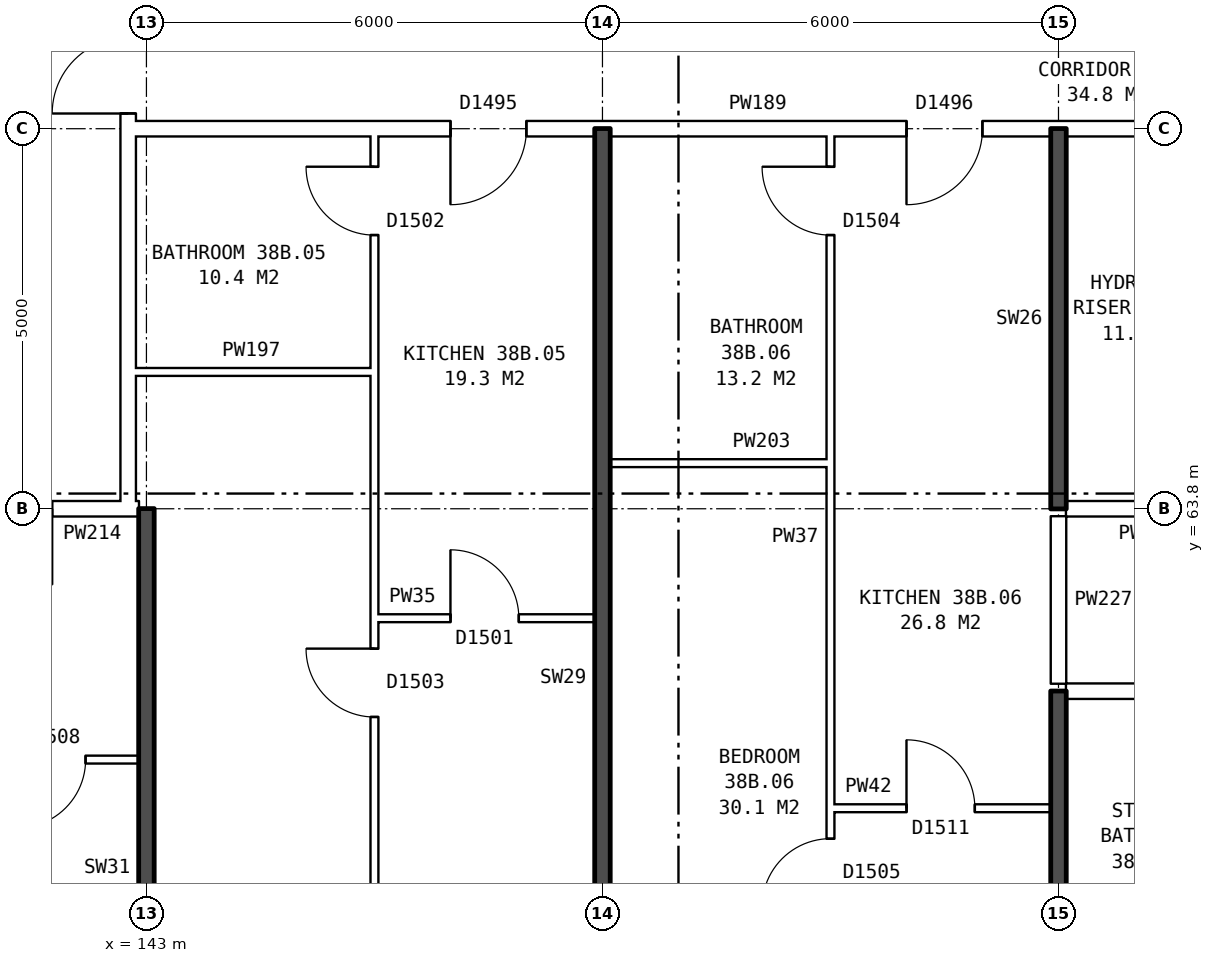
"""IFC4 building model, lengths in metres.
Left out: names, types, materials, properties, quantities, classifications, styles, units other than length and angle.
Written with IfcOpenShell. Run it as: python <this file> out.ifc"""

import sys

from ifc_helpers import new_model, si_unit, direction, frame, frame_2d, origin, place, context, subcontext, project, spatial, rectangle, extrude, element, fill, save


model = new_model("IFC4")
c1 = context("Model", 3, precision=1e-05, world=origin(), true_north=direction((0.0, 1.0)))
c2 = subcontext(c1, "Body", "Model", "MODEL_VIEW")
j1 = project(units=[si_unit("LENGTHUNIT", "METRE"), si_unit("PLANEANGLEUNIT", "RADIAN")], contexts=[c1])
p1 = place(None, origin())
s1 = spatial("IfcSite", under=j1, at=p1, CompositionType="ELEMENT")
p2 = place(p1, origin())
s2 = spatial("IfcBuilding", under=s1, at=p2, CompositionType="ELEMENT")
p3 = place(p2, frame((0.0, 0.0, 136.1)))
s3 = spatial("IfcBuildingStorey", under=s2, at=p3, CompositionType="ELEMENT", Elevation=136.1)
p4 = place(p3, frame((142.76, 63.9, 0.0), z_axis=(0.0, 0.0, 1.0), x_axis=(0.0, 1.0, 0.0)))
e1 = element("IfcWall", 1, at=p4, inside=s3, PredefinedType="PARTITIONING", context=c2, shape_type="SweptSolid", body=[
    extrude(rectangle(XDim=12.2, YDim=0.2, at=frame_2d((6.1, 0.0))), origin(), (0.0, 0.0, 1.0), 2.85),
])
p5 = place(p4, frame((5.1, 0.0, 0.0)))
e2 = element("IfcOpeningElement", 2, at=p5, cuts=e1, PredefinedType="OPENING", context=c2, shape_type="SweptSolid", body=[
    extrude(rectangle(XDim=2.0, YDim=2.1, at=frame_2d((1.0, 1.05))), frame((0.0, 0.11, 0.0), z_axis=(0.0, -1.0, 0.0), x_axis=(1.0, 0.0, 0.0)), (0.0, 0.0, 1.0), 0.22),
])
p6 = place(p3, frame((152.0, 59.86, 0.0), z_axis=(0.0, 0.0, 1.0), x_axis=(1.0, 0.0, 0.0)))
e3 = element("IfcWall", 3, at=p6, inside=s3, PredefinedType="PARTITIONING", context=c2, shape_type="SweptSolid", body=[
    extrude(rectangle(XDim=2.9, YDim=0.1, at=frame_2d((1.45, 0.0))), origin(), (0.0, 0.0, 1.0), 2.85),
])
p7 = place(p6, frame((1.0, 0.0, 0.0)))
e4 = element("IfcOpeningElement", 4, at=p7, cuts=e3, PredefinedType="OPENING", context=c2, shape_type="SweptSolid", body=[
    extrude(rectangle(XDim=0.9, YDim=2.1, at=frame_2d((0.45, 1.05))), frame((0.0, 0.06, 0.0), z_axis=(0.0, -1.0, 0.0), x_axis=(1.0, 0.0, 0.0)), (0.0, 0.0, 1.0), 0.12),
])
p8 = place(p3, frame((137.1, 60.5, 0.0), z_axis=(0.0, 0.0, 1.0), x_axis=(1.0, 0.0, 0.0)))
e5 = element("IfcWall", 5, at=p8, inside=s3, PredefinedType="PARTITIONING", context=c2, shape_type="SweptSolid", body=[
    extrude(rectangle(XDim=5.8, YDim=0.1, at=frame_2d((2.9, 0.0))), origin(), (0.0, 0.0, 1.0), 2.85),
])
p9 = place(p8, frame((1.3, 0.0, 0.0)))
e6 = element("IfcOpeningElement", 6, at=p9, cuts=e5, PredefinedType="OPENING", context=c2, shape_type="SweptSolid", body=[
    extrude(rectangle(XDim=0.9, YDim=2.1, at=frame_2d((0.45, 1.05))), frame((0.0, 0.06, 0.0), z_axis=(0.0, -1.0, 0.0), x_axis=(1.0, 0.0, 0.0)), (0.0, 0.0, 1.0), 0.12),
])
p10 = place(p8, frame((4.2, 0.0, 0.0)))
e7 = element("IfcOpeningElement", 7, at=p10, cuts=e5, PredefinedType="OPENING", context=c2, shape_type="SweptSolid", body=[
    extrude(rectangle(XDim=0.9, YDim=2.1, at=frame_2d((0.45, 1.05))), frame((0.0, 0.06, 0.0), z_axis=(0.0, -1.0, 0.0), x_axis=(1.0, 0.0, 0.0)), (0.0, 0.0, 1.0), 0.12),
])
p11 = place(p3, frame((155.1, 61.4, 0.0), z_axis=(0.0, 0.0, 1.0), x_axis=(1.0, 0.0, 0.0)))
e8 = element("IfcWall", 8, at=p11, inside=s3, PredefinedType="PARTITIONING", context=c2, shape_type="SweptSolid", body=[
    extrude(rectangle(XDim=17.29, YDim=0.2, at=frame_2d((8.645, 0.0))), origin(), (0.0, 0.0, 1.0), 2.85),
])
p12 = place(p11, frame((3.6, 0.0, 0.0)))
e9 = element("IfcOpeningElement", 9, at=p12, cuts=e8, PredefinedType="OPENING", context=c2, shape_type="SweptSolid", body=[
    extrude(rectangle(XDim=1.0, YDim=2.1, at=frame_2d((0.5, 1.05))), frame((0.0, 0.11, 0.0), z_axis=(0.0, -1.0, 0.0), x_axis=(1.0, 0.0, 0.0)), (0.0, 0.0, 1.0), 0.22),
])
p13 = place(p11, frame((8.4, 0.0, 0.0)))
e10 = element("IfcOpeningElement", 10, at=p13, cuts=e8, PredefinedType="OPENING", context=c2, shape_type="SweptSolid", body=[
    extrude(rectangle(XDim=1.0, YDim=2.1, at=frame_2d((0.5, 1.05))), frame((0.0, 0.11, 0.0), z_axis=(0.0, -1.0, 0.0), x_axis=(1.0, 0.0, 0.0)), (0.0, 0.0, 1.0), 0.22),
])
p14 = place(p3, frame((146.0, 62.36, 0.0), z_axis=(0.0, 0.0, 1.0), x_axis=(1.0, 0.0, 0.0)))
e11 = element("IfcWall", 11, at=p14, inside=s3, PredefinedType="PARTITIONING", context=c2, shape_type="SweptSolid", body=[
    extrude(rectangle(XDim=2.9, YDim=0.1, at=frame_2d((1.45, 0.0))), origin(), (0.0, 0.0, 1.0), 2.85),
])
p15 = place(p14, frame((1.0, 0.0, 0.0)))
e12 = element("IfcOpeningElement", 12, at=p15, cuts=e11, PredefinedType="OPENING", context=c2, shape_type="SweptSolid", body=[
    extrude(rectangle(XDim=0.9, YDim=2.1, at=frame_2d((0.45, 1.05))), frame((0.0, 0.06, 0.0), z_axis=(0.0, -1.0, 0.0), x_axis=(1.0, 0.0, 0.0)), (0.0, 0.0, 1.0), 0.12),
])
p16 = place(p3, frame((139.76, 63.8, 0.0), z_axis=(0.0, 0.0, 1.0), x_axis=(1.0, 0.0, 0.0)))
e13 = element("IfcWall", 13, at=p16, inside=s3, PredefinedType="PARTITIONING", context=c2, shape_type="SweptSolid", body=[
    extrude(rectangle(XDim=3.0, YDim=0.2, at=frame_2d((1.5, 0.0))), origin(), (0.0, 0.0, 1.0), 2.85),
])
p17 = place(p16, frame((1.0, 0.0, 0.0)))
e14 = element("IfcOpeningElement", 14, at=p17, cuts=e13, PredefinedType="OPENING", context=c2, shape_type="SweptSolid", body=[
    extrude(rectangle(XDim=1.0, YDim=2.1, at=frame_2d((0.5, 1.05))), frame((0.0, 0.11, 0.0), z_axis=(0.0, -1.0, 0.0), x_axis=(1.0, 0.0, 0.0)), (0.0, 0.0, 1.0), 0.22),
])
p18 = place(p3, frame((142.76, 63.8, 0.0), z_axis=(0.0, 0.0, 1.0), x_axis=(1.0, 0.0, 0.0)))
e15 = element("IfcWall", 15, at=p18, inside=s3, PredefinedType="PARTITIONING", context=c2, shape_type="SweptSolid", body=[
    extrude(rectangle(XDim=0.14, YDim=0.2, at=frame_2d((0.07, 0.0))), origin(), (0.0, 0.0, 1.0), 2.85),
])
p19 = place(p3, frame((155.1, 63.8, 0.0), z_axis=(0.0, 0.0, 1.0), x_axis=(1.0, 0.0, 0.0)))
e16 = element("IfcWall", 16, at=p19, inside=s3, PredefinedType="PARTITIONING", context=c2, shape_type="SweptSolid", body=[
    extrude(rectangle(XDim=2.14, YDim=0.2, at=frame_2d((1.07, 0.0))), origin(), (0.0, 0.0, 1.0), 2.85),
])
p20 = place(p3, frame((149.1, 64.4, 0.0), z_axis=(0.0, 0.0, 1.0), x_axis=(1.0, 0.0, 0.0)))
e17 = element("IfcWall", 17, at=p20, inside=s3, PredefinedType="PARTITIONING", context=c2, shape_type="SweptSolid", body=[
    extrude(rectangle(XDim=2.9, YDim=0.1, at=frame_2d((1.45, 0.0))), origin(), (0.0, 0.0, 1.0), 2.85),
])
p21 = place(p3, frame((142.76, 65.6, 0.0), z_axis=(0.0, 0.0, 1.0), x_axis=(1.0, 0.0, 0.0)))
e18 = element("IfcWall", 18, at=p21, inside=s3, PredefinedType="PARTITIONING", context=c2, shape_type="SweptSolid", body=[
    extrude(rectangle(XDim=3.24, YDim=0.1, at=frame_2d((1.62, 0.0))), origin(), (0.0, 0.0, 1.0), 2.85),
])
p22 = place(p3, frame((142.76, 68.8, 0.0), z_axis=(0.0, 0.0, 1.0), x_axis=(1.0, 0.0, 0.0)))
e19 = element("IfcWall", 19, at=p22, inside=s3, PredefinedType="PARTITIONING", context=c2, shape_type="SweptSolid", body=[
    extrude(rectangle(XDim=14.48, YDim=0.2, at=frame_2d((7.24, 0.0))), origin(), (0.0, 0.0, 1.0), 2.85),
])
p23 = place(p22, frame((4.24, 0.0, 0.0)))
e20 = element("IfcOpeningElement", 20, at=p23, cuts=e19, PredefinedType="OPENING", context=c2, shape_type="SweptSolid", body=[
    extrude(rectangle(XDim=1.0, YDim=2.1, at=frame_2d((0.5, 1.05))), frame((0.0, 0.11, 0.0), z_axis=(0.0, -1.0, 0.0), x_axis=(1.0, 0.0, 0.0)), (0.0, 0.0, 1.0), 0.22),
])
p24 = place(p22, frame((10.24, 0.0, 0.0)))
e21 = element("IfcOpeningElement", 21, at=p24, cuts=e19, PredefinedType="OPENING", context=c2, shape_type="SweptSolid", body=[
    extrude(rectangle(XDim=1.0, YDim=2.1, at=frame_2d((0.5, 1.05))), frame((0.0, 0.11, 0.0), z_axis=(0.0, -1.0, 0.0), x_axis=(1.0, 0.0, 0.0)), (0.0, 0.0, 1.0), 0.22),
])
p25 = place(p3, frame((143.0, 54.36, 0.0), z_axis=(0.0, 0.0, 1.0), x_axis=(0.0, 1.0, 0.0)))
e22 = element("IfcWall", 22, at=p25, inside=s3, PredefinedType="SOLIDWALL", context=c2, shape_type="SweptSolid", body=[
    extrude(rectangle(XDim=9.44, YDim=0.2, at=frame_2d((4.72, 0.0))), origin(), (0.0, 0.0, 1.0), 2.85),
])
p26 = place(p3, frame((146.0, 54.36, 0.0), z_axis=(0.0, 0.0, 1.0), x_axis=(0.0, 1.0, 0.0)))
e23 = element("IfcWall", 23, at=p26, inside=s3, PredefinedType="PARTITIONING", context=c2, shape_type="SweptSolid", body=[
    extrude(rectangle(XDim=14.34, YDim=0.1, at=frame_2d((7.17, 0.0))), origin(), (0.0, 0.0, 1.0), 2.85),
])
p27 = place(p26, frame((6.7, 0.0, 0.0)))
e24 = element("IfcOpeningElement", 24, at=p27, cuts=e23, PredefinedType="OPENING", context=c2, shape_type="SweptSolid", body=[
    extrude(rectangle(XDim=0.9, YDim=2.1, at=frame_2d((0.45, 1.05))), frame((0.0, 0.06, 0.0), z_axis=(0.0, -1.0, 0.0), x_axis=(1.0, 0.0, 0.0)), (0.0, 0.0, 1.0), 0.12),
])
p28 = place(p26, frame((13.04, 0.0, 0.0)))
e25 = element("IfcOpeningElement", 25, at=p28, cuts=e23, PredefinedType="OPENING", context=c2, shape_type="SweptSolid", body=[
    extrude(rectangle(XDim=0.9, YDim=2.1, at=frame_2d((0.45, 1.05))), frame((0.0, 0.06, 0.0), z_axis=(0.0, -1.0, 0.0), x_axis=(1.0, 0.0, 0.0)), (0.0, 0.0, 1.0), 0.12),
])
p29 = place(p3, frame((149.0, 54.36, 0.0), z_axis=(0.0, 0.0, 1.0), x_axis=(0.0, 1.0, 0.0)))
e26 = element("IfcWall", 26, at=p29, inside=s3, PredefinedType="SOLIDWALL", context=c2, shape_type="SweptSolid", body=[
    extrude(rectangle(XDim=14.44, YDim=0.2, at=frame_2d((7.22, 0.0))), origin(), (0.0, 0.0, 1.0), 2.85),
])
p30 = place(p3, frame((152.0, 54.36, 0.0), z_axis=(0.0, 0.0, 1.0), x_axis=(0.0, 1.0, 0.0)))
e27 = element("IfcWall", 27, at=p30, inside=s3, PredefinedType="PARTITIONING", context=c2, shape_type="SweptSolid", body=[
    extrude(rectangle(XDim=14.34, YDim=0.1, at=frame_2d((7.17, 0.0))), origin(), (0.0, 0.0, 1.0), 2.85),
])
p31 = place(p30, frame((4.2, 0.0, 0.0)))
e28 = element("IfcOpeningElement", 28, at=p31, cuts=e27, PredefinedType="OPENING", context=c2, shape_type="SweptSolid", body=[
    extrude(rectangle(XDim=0.9, YDim=2.1, at=frame_2d((0.45, 1.05))), frame((0.0, 0.06, 0.0), z_axis=(0.0, -1.0, 0.0), x_axis=(1.0, 0.0, 0.0)), (0.0, 0.0, 1.0), 0.12),
])
p32 = place(p30, frame((13.04, 0.0, 0.0)))
e29 = element("IfcOpeningElement", 29, at=p32, cuts=e27, PredefinedType="OPENING", context=c2, shape_type="SweptSolid", body=[
    extrude(rectangle(XDim=0.9, YDim=2.1, at=frame_2d((0.45, 1.05))), frame((0.0, 0.06, 0.0), z_axis=(0.0, -1.0, 0.0), x_axis=(1.0, 0.0, 0.0)), (0.0, 0.0, 1.0), 0.12),
])
p33 = place(p3, frame((155.0, 54.36, 0.0), z_axis=(0.0, 0.0, 1.0), x_axis=(0.0, 1.0, 0.0)))
e30 = element("IfcWall", 30, at=p33, inside=s3, PredefinedType="SOLIDWALL", context=c2, shape_type="SweptSolid", body=[
    extrude(rectangle(XDim=7.04, YDim=0.2, at=frame_2d((3.52, 0.0))), origin(), (0.0, 0.0, 1.0), 2.85),
])
p34 = place(p3, frame((155.0, 61.5, 0.0), z_axis=(0.0, 0.0, 1.0), x_axis=(0.0, 1.0, 0.0)))
e31 = element("IfcWall", 31, at=p34, inside=s3, PredefinedType="PARTITIONING", context=c2, shape_type="SweptSolid", body=[
    extrude(rectangle(XDim=2.2, YDim=0.2, at=frame_2d((1.1, 0.0))), origin(), (0.0, 0.0, 1.0), 2.85),
])
p35 = place(p3, frame((155.0, 63.8, 0.0), z_axis=(0.0, 0.0, 1.0), x_axis=(0.0, 1.0, 0.0)))
e32 = element("IfcWall", 32, at=p35, inside=s3, PredefinedType="SOLIDWALL", context=c2, shape_type="SweptSolid", body=[
    extrude(rectangle(XDim=5.0, YDim=0.2, at=frame_2d((2.5, 0.0))), origin(), (0.0, 0.0, 1.0), 2.85),
])
p36 = place(p5, origin())
e33 = element("IfcDoor", 33, at=p36, inside=s3, OperationType="DOUBLE_DOOR_SINGLE_SWING", PredefinedType="DOOR", context=c2, shape_type="SweptSolid", body=[
    extrude(rectangle(XDim=2.0, YDim=2.1, at=frame_2d((1.0, 1.05))), frame((0.0, 0.025, 0.0), z_axis=(0.0, -1.0, 0.0), x_axis=(1.0, 0.0, 0.0)), (0.0, 0.0, 1.0), 0.05),
])
fill(e2, e33)
p37 = place(p10, frame((0.9, 0.0, 0.0), z_axis=(0.0, 0.0, 1.0), x_axis=(-1.0, 0.0, 0.0)))
e34 = element("IfcDoor", 34, at=p37, inside=s3, OperationType="SINGLE_SWING_RIGHT", PredefinedType="DOOR", context=c2, shape_type="SweptSolid", body=[
    extrude(rectangle(XDim=0.9, YDim=2.1, at=frame_2d((0.45, 1.05))), frame((0.0, 0.025, 0.0), z_axis=(0.0, -1.0, 0.0), x_axis=(1.0, 0.0, 0.0)), (0.0, 0.0, 1.0), 0.05),
])
fill(e7, e34)
p38 = place(p27, origin())
e35 = element("IfcDoor", 35, at=p38, inside=s3, OperationType="SINGLE_SWING_RIGHT", PredefinedType="DOOR", context=c2, shape_type="SweptSolid", body=[
    extrude(rectangle(XDim=0.9, YDim=2.1, at=frame_2d((0.45, 1.05))), frame((0.0, 0.025, 0.0), z_axis=(0.0, -1.0, 0.0), x_axis=(1.0, 0.0, 0.0)), (0.0, 0.0, 1.0), 0.05),
])
fill(e24, e35)
p39 = place(p23, frame((1.0, 0.0, 0.0), z_axis=(0.0, 0.0, 1.0), x_axis=(-1.0, 0.0, 0.0)))
e36 = element("IfcDoor", 36, at=p39, inside=s3, OperationType="SINGLE_SWING_RIGHT", PredefinedType="DOOR", context=c2, shape_type="SweptSolid", body=[
    extrude(rectangle(XDim=1.0, YDim=2.1, at=frame_2d((0.5, 1.05))), frame((0.0, 0.025, 0.0), z_axis=(0.0, -1.0, 0.0), x_axis=(1.0, 0.0, 0.0)), (0.0, 0.0, 1.0), 0.05),
])
fill(e20, e36)
p40 = place(p15, origin())
e37 = element("IfcDoor", 37, at=p40, inside=s3, OperationType="SINGLE_SWING_LEFT", PredefinedType="DOOR", context=c2, shape_type="SweptSolid", body=[
    extrude(rectangle(XDim=0.9, YDim=2.1, at=frame_2d((0.45, 1.05))), frame((0.0, 0.025, 0.0), z_axis=(0.0, -1.0, 0.0), x_axis=(1.0, 0.0, 0.0)), (0.0, 0.0, 1.0), 0.05),
])
fill(e12, e37)
p41 = place(p28, origin())
e38 = element("IfcDoor", 38, at=p41, inside=s3, OperationType="SINGLE_SWING_RIGHT", PredefinedType="DOOR", context=c2, shape_type="SweptSolid", body=[
    extrude(rectangle(XDim=0.9, YDim=2.1, at=frame_2d((0.45, 1.05))), frame((0.0, 0.025, 0.0), z_axis=(0.0, -1.0, 0.0), x_axis=(1.0, 0.0, 0.0)), (0.0, 0.0, 1.0), 0.05),
])
fill(e25, e38)
p42 = place(p31, origin())
e39 = element("IfcDoor", 39, at=p42, inside=s3, OperationType="SINGLE_SWING_LEFT", PredefinedType="DOOR", context=c2, shape_type="SweptSolid", body=[
    extrude(rectangle(XDim=0.9, YDim=2.1, at=frame_2d((0.45, 1.05))), frame((0.0, 0.025, 0.0), z_axis=(0.0, -1.0, 0.0), x_axis=(1.0, 0.0, 0.0)), (0.0, 0.0, 1.0), 0.05),
])
fill(e28, e39)
p43 = place(p24, frame((1.0, 0.0, 0.0), z_axis=(0.0, 0.0, 1.0), x_axis=(-1.0, 0.0, 0.0)))
e40 = element("IfcDoor", 40, at=p43, inside=s3, OperationType="SINGLE_SWING_RIGHT", PredefinedType="DOOR", context=c2, shape_type="SweptSolid", body=[
    extrude(rectangle(XDim=1.0, YDim=2.1, at=frame_2d((0.5, 1.05))), frame((0.0, 0.025, 0.0), z_axis=(0.0, -1.0, 0.0), x_axis=(1.0, 0.0, 0.0)), (0.0, 0.0, 1.0), 0.05),
])
fill(e21, e40)
p44 = place(p7, origin())
e41 = element("IfcDoor", 41, at=p44, inside=s3, OperationType="SINGLE_SWING_LEFT", PredefinedType="DOOR", context=c2, shape_type="SweptSolid", body=[
    extrude(rectangle(XDim=0.9, YDim=2.1, at=frame_2d((0.45, 1.05))), frame((0.0, 0.025, 0.0), z_axis=(0.0, -1.0, 0.0), x_axis=(1.0, 0.0, 0.0)), (0.0, 0.0, 1.0), 0.05),
])
fill(e4, e41)
p45 = place(p32, origin())
e42 = element("IfcDoor", 42, at=p45, inside=s3, OperationType="SINGLE_SWING_RIGHT", PredefinedType="DOOR", context=c2, shape_type="SweptSolid", body=[
    extrude(rectangle(XDim=0.9, YDim=2.1, at=frame_2d((0.45, 1.05))), frame((0.0, 0.025, 0.0), z_axis=(0.0, -1.0, 0.0), x_axis=(1.0, 0.0, 0.0)), (0.0, 0.0, 1.0), 0.05),
])
fill(e29, e42)
save(model, sys.argv[1])
